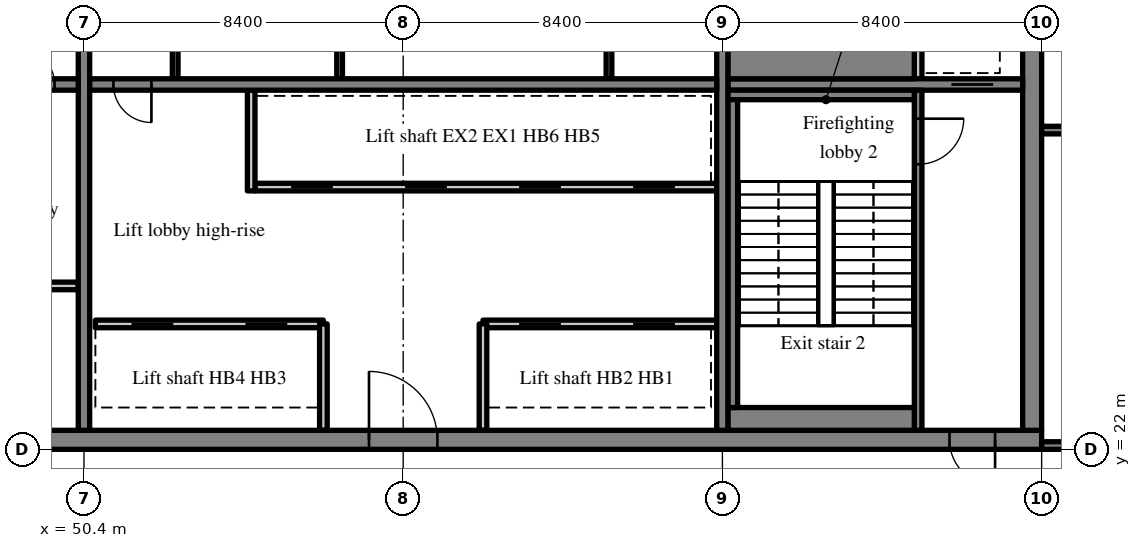
"""IFC4 building model, lengths in metres.
Left out: names, types, materials, properties, quantities, classifications, styles, units other than length and angle.
Written with IfcOpenShell. Run it as: python <this file> out.ifc"""

import sys

from ifc_helpers import new_model, si_unit, direction, frame, frame_2d, origin, place, context, subcontext, project, spatial, rectangle, extrude, source, transform, mapped, element, fill, save


model = new_model("IFC4")
c1 = context("Model", 3, precision=1e-05, world=origin(), true_north=direction((0.0, 1.0)))
c2 = subcontext(c1, "Body", "Model", "MODEL_VIEW")
j1 = project(units=[si_unit("LENGTHUNIT", "METRE"), si_unit("PLANEANGLEUNIT", "RADIAN")], contexts=[c1])
p1 = place(None, origin())
s1 = spatial("IfcSite", under=j1, at=p1, CompositionType="ELEMENT")
p2 = place(p1, origin())
s2 = spatial("IfcBuilding", under=s1, at=p2, CompositionType="ELEMENT")
p3 = place(p2, frame((0.0, 0.0, 323.7)))
s3 = spatial("IfcBuildingStorey", under=s2, at=p3, CompositionType="ELEMENT", Elevation=323.7)
m1 = source(origin(), c2, "Body", "SweptSolid", [
    extrude(rectangle(XDim=50.4, YDim=0.5, at=frame_2d((25.2, 0.0))), origin(), (0.0, 0.0, 1.0), 5.72),
])
p4 = place(p3, frame((25.2, 22.25, 0.0), z_axis=(0.0, 0.0, 1.0), x_axis=(1.0, 0.0, 0.0)))
e1 = element("IfcWall", 1, at=p4, inside=s3, PredefinedType="SHEAR", context=c2, shape_type="MappedRepresentation", body=[
    mapped(m1, transform((0.0, 0.0, 0.0), scale=1.0)),
])
m2 = source(origin(), c2, "Body", "SweptSolid", [
    extrude(rectangle(XDim=1.8, YDim=2.1, at=frame_2d((0.9, 1.05))), frame((0.0, 0.26, 0.0), z_axis=(0.0, -1.0, 0.0), x_axis=(1.0, 0.0, 0.0)), (0.0, 0.0, 1.0), 0.52),
])
p5 = place(p4, frame((15.9, 0.0, 0.0)))
e2 = element("IfcOpeningElement", 2, at=p5, cuts=e1, PredefinedType="OPENING", context=c2, shape_type="MappedRepresentation", body=[
    mapped(m2, transform((0.0, 0.0, 0.0), scale=1.0)),
])
m3 = source(origin(), c2, "Body", "SweptSolid", [
    extrude(rectangle(XDim=0.9, YDim=2.1, at=frame_2d((0.45, 1.05))), frame((0.0, 0.26, 0.0), z_axis=(0.0, -1.0, 0.0), x_axis=(1.0, 0.0, 0.0)), (0.0, 0.0, 1.0), 0.52),
])
p6 = place(p4, frame((9.675, 0.0, 0.0)))
e3 = element("IfcOpeningElement", 3, at=p6, cuts=e1, PredefinedType="OPENING", context=c2, shape_type="MappedRepresentation", body=[
    mapped(m3, transform((0.0, 0.0, 0.0), scale=1.0)),
])
p7 = place(p4, frame((21.525, 0.0, 0.0)))
e4 = element("IfcOpeningElement", 4, at=p7, cuts=e1, PredefinedType="OPENING", context=c2, shape_type="MappedRepresentation", body=[
    mapped(m3, transform((0.0, 0.0, 0.0), scale=1.0)),
])
p8 = place(p4, frame((32.7, 0.0, 0.0)))
e5 = element("IfcOpeningElement", 5, at=p8, cuts=e1, PredefinedType="OPENING", context=c2, shape_type="MappedRepresentation", body=[
    mapped(m2, transform((0.0, 0.0, 0.0), scale=1.0)),
])
m4 = source(origin(), c2, "Body", "SweptSolid", [
    extrude(rectangle(XDim=1.2, YDim=2.1, at=frame_2d((0.6, 1.05))), frame((0.0, 0.26, 0.0), z_axis=(0.0, -1.0, 0.0), x_axis=(1.0, 0.0, 0.0)), (0.0, 0.0, 1.0), 0.52),
])
p9 = place(p4, frame((6.5, 0.0, 0.0)))
e6 = element("IfcOpeningElement", 6, at=p9, cuts=e1, PredefinedType="OPENING", context=c2, shape_type="MappedRepresentation", body=[
    mapped(m4, transform((0.0, 0.0, 0.0), scale=1.0)),
])
p10 = place(p4, frame((47.975, 0.0, 0.0)))
e7 = element("IfcOpeningElement", 7, at=p10, cuts=e1, PredefinedType="OPENING", context=c2, shape_type="MappedRepresentation", body=[
    mapped(m4, transform((0.0, 0.0, 0.0), scale=1.0)),
])
m5 = source(origin(), c2, "Body", "SweptSolid", [
    extrude(rectangle(XDim=19.0, YDim=0.5, at=frame_2d((9.5, 0.0))), origin(), (0.0, 0.0, 1.0), 5.72),
])
p11 = place(p3, frame((75.35, 22.5, 0.0), z_axis=(0.0, 0.0, 1.0), x_axis=(0.0, 1.0, 0.0)))
e8 = element("IfcWall", 8, at=p11, inside=s3, PredefinedType="SHEAR", context=c2, shape_type="MappedRepresentation", body=[
    mapped(m5, transform((0.0, 0.0, 0.0), scale=1.0)),
])
p12 = place(p11, frame((12.9, 0.0, 0.0)))
e9 = element("IfcOpeningElement", 9, at=p12, cuts=e8, PredefinedType="OPENING", context=c2, shape_type="MappedRepresentation", body=[
    mapped(m4, transform((0.0, 0.0, 0.0), scale=1.0)),
])
m6 = source(origin(), c2, "Body", "SweptSolid", [
    extrude(rectangle(XDim=19.0, YDim=0.3, at=frame_2d((9.5, 0.0))), origin(), (0.0, 0.0, 1.0), 5.72),
])
p13 = place(p3, frame((50.4, 22.5, 0.0), z_axis=(0.0, 0.0, 1.0), x_axis=(0.0, 1.0, 0.0)))
e10 = element("IfcWall", 10, at=p13, inside=s3, PredefinedType="SHEAR", context=c2, shape_type="MappedRepresentation", body=[
    mapped(m6, transform((0.0, 0.0, 0.0), scale=1.0)),
])
m7 = source(origin(), c2, "Body", "SweptSolid", [
    extrude(rectangle(XDim=1.1, YDim=2.1, at=frame_2d((0.55, 1.05))), frame((0.0, 0.16, 0.0), z_axis=(0.0, -1.0, 0.0), x_axis=(1.0, 0.0, 0.0)), (0.0, 0.0, 1.0), 0.32),
])
p14 = place(p13, frame((12.95, 0.0, 0.0)))
e11 = element("IfcOpeningElement", 11, at=p14, cuts=e10, PredefinedType="OPENING", context=c2, shape_type="MappedRepresentation", body=[
    mapped(m7, transform((0.0, 0.0, 0.0), scale=1.0)),
])
p15 = place(p3, frame((67.2, 22.5, 0.0), z_axis=(0.0, 0.0, 1.0), x_axis=(0.0, 1.0, 0.0)))
e12 = element("IfcWall", 12, at=p15, inside=s3, PredefinedType="SHEAR", context=c2, shape_type="MappedRepresentation", body=[
    mapped(m6, transform((0.0, 0.0, 0.0), scale=1.0)),
])
m8 = source(origin(), c2, "Body", "SweptSolid", [
    extrude(rectangle(XDim=16.5, YDim=0.3, at=frame_2d((8.25, 0.0))), origin(), (0.0, 0.0, 1.0), 5.72),
])
p16 = place(p3, frame((33.75, 31.6, 0.0), z_axis=(0.0, 0.0, 1.0), x_axis=(1.0, 0.0, 0.0)))
e13 = element("IfcWall", 13, at=p16, inside=s3, PredefinedType="SHEAR", context=c2, shape_type="MappedRepresentation", body=[
    mapped(m8, transform((0.0, 0.0, 0.0), scale=1.0)),
])
m9 = source(origin(), c2, "Body", "SweptSolid", [
    extrude(rectangle(XDim=1.0, YDim=2.1, at=frame_2d((0.5, 1.05))), frame((0.0, 0.16, 0.0), z_axis=(0.0, -1.0, 0.0), x_axis=(1.0, 0.0, 0.0)), (0.0, 0.0, 1.0), 0.32),
])
p17 = place(p16, frame((14.875, 0.0, 0.0)))
e14 = element("IfcOpeningElement", 14, at=p17, cuts=e13, PredefinedType="OPENING", context=c2, shape_type="MappedRepresentation", body=[
    mapped(m9, transform((0.0, 0.0, 0.0), scale=1.0)),
])
p18 = place(p3, frame((50.55, 31.6, 0.0), z_axis=(0.0, 0.0, 1.0), x_axis=(1.0, 0.0, 0.0)))
e15 = element("IfcWall", 15, at=p18, inside=s3, PredefinedType="SHEAR", context=c2, shape_type="MappedRepresentation", body=[
    mapped(m8, transform((0.0, 0.0, 0.0), scale=1.0)),
])
p19 = place(p18, frame((0.625, 0.0, 0.0)))
e16 = element("IfcOpeningElement", 16, at=p19, cuts=e15, PredefinedType="OPENING", context=c2, shape_type="MappedRepresentation", body=[
    mapped(m9, transform((0.0, 0.0, 0.0), scale=1.0)),
])
m10 = source(origin(), c2, "Body", "SweptSolid", [
    extrude(rectangle(XDim=7.75, YDim=0.3, at=frame_2d((3.875, 0.0))), origin(), (0.0, 0.0, 1.0), 5.72),
])
p20 = place(p3, frame((67.35, 31.6, 0.0), z_axis=(0.0, 0.0, 1.0), x_axis=(1.0, 0.0, 0.0)))
e17 = element("IfcWall", 17, at=p20, inside=s3, PredefinedType="SHEAR", context=c2, shape_type="MappedRepresentation", body=[
    mapped(m10, transform((0.0, 0.0, 0.0), scale=1.0)),
])
p21 = place(p20, frame((5.875, 0.0, 0.0)))
e18 = element("IfcOpeningElement", 18, at=p21, cuts=e17, PredefinedType="OPENING", context=c2, shape_type="MappedRepresentation", body=[
    mapped(m7, transform((0.0, 0.0, 0.0), scale=1.0)),
])
m11 = source(origin(), c2, "Body", "SweptSolid", [
    extrude(rectangle(XDim=6.15, YDim=0.2, at=frame_2d((3.075, 0.0))), origin(), (0.0, 0.0, 1.0), 5.72),
])
p22 = place(p3, frame((44.1, 26.3, 0.0), z_axis=(0.0, 0.0, 1.0), x_axis=(1.0, 0.0, 0.0)))
e19 = element("IfcWall", 19, at=p22, inside=s3, PredefinedType="PARTITIONING", context=c2, shape_type="MappedRepresentation", body=[
    mapped(m11, transform((0.0, 0.0, 0.0), scale=1.0)),
])
m12 = source(origin(), c2, "Body", "SweptSolid", [
    extrude(rectangle(XDim=6.15, YDim=0.2, at=frame_2d((3.075, 0.0))), origin(), (0.0, 0.0, 1.0), 5.72),
])
p23 = place(p3, frame((67.05, 25.3, 0.0), z_axis=(0.0, 0.0, 1.0), x_axis=(-1.0, 0.0, 0.0)))
e20 = element("IfcWall", 20, at=p23, inside=s3, PredefinedType="SOLIDWALL", context=c2, shape_type="MappedRepresentation", body=[
    mapped(m12, transform((0.0, 0.0, 0.0), scale=1.0)),
])
m13 = source(origin(), c2, "Body", "SweptSolid", [
    extrude(rectangle(XDim=1.1, YDim=2.1, at=frame_2d((0.55, 1.05))), frame((0.0, 0.11, 0.0), z_axis=(0.0, -1.0, 0.0), x_axis=(1.0, 0.0, 0.0)), (0.0, 0.0, 1.0), 0.22),
])
p24 = place(p23, frame((1.1, 0.0, 0.0)))
e21 = element("IfcOpeningElement", 21, at=p24, cuts=e20, PredefinedType="OPENING", context=c2, shape_type="MappedRepresentation", body=[
    mapped(m13, transform((0.0, 0.0, 0.0), scale=1.0)),
])
p25 = place(p23, frame((4.1, 0.0, 0.0)))
e22 = element("IfcOpeningElement", 22, at=p25, cuts=e20, PredefinedType="OPENING", context=c2, shape_type="MappedRepresentation", body=[
    mapped(m13, transform((0.0, 0.0, 0.0), scale=1.0)),
])
m14 = source(origin(), c2, "Body", "SweptSolid", [
    extrude(rectangle(XDim=6.0, YDim=0.2, at=frame_2d((3.0, 0.0))), origin(), (0.0, 0.0, 1.0), 5.72),
])
p26 = place(p3, frame((56.7, 25.3, 0.0), z_axis=(0.0, 0.0, 1.0), x_axis=(-1.0, 0.0, 0.0)))
e23 = element("IfcWall", 23, at=p26, inside=s3, PredefinedType="SOLIDWALL", context=c2, shape_type="MappedRepresentation", body=[
    mapped(m14, transform((0.0, 0.0, 0.0), scale=1.0)),
])
p27 = place(p26, frame((0.95, 0.0, 0.0)))
e24 = element("IfcOpeningElement", 24, at=p27, cuts=e23, PredefinedType="OPENING", context=c2, shape_type="MappedRepresentation", body=[
    mapped(m13, transform((0.0, 0.0, 0.0), scale=1.0)),
])
p28 = place(p26, frame((3.95, 0.0, 0.0)))
e25 = element("IfcOpeningElement", 25, at=p28, cuts=e23, PredefinedType="OPENING", context=c2, shape_type="MappedRepresentation", body=[
    mapped(m13, transform((0.0, 0.0, 0.0), scale=1.0)),
])
m15 = source(origin(), c2, "Body", "SweptSolid", [
    extrude(rectangle(XDim=12.15, YDim=0.2, at=frame_2d((6.075, 0.0))), origin(), (0.0, 0.0, 1.0), 5.72),
])
p29 = place(p3, frame((67.05, 28.9, 0.0), z_axis=(0.0, 0.0, 1.0), x_axis=(-1.0, 0.0, 0.0)))
e26 = element("IfcWall", 26, at=p29, inside=s3, PredefinedType="SOLIDWALL", context=c2, shape_type="MappedRepresentation", body=[
    mapped(m15, transform((0.0, 0.0, 0.0), scale=1.0)),
])
p30 = place(p29, frame((7.1, 0.0, 0.0)))
e27 = element("IfcOpeningElement", 27, at=p30, cuts=e26, PredefinedType="OPENING", context=c2, shape_type="MappedRepresentation", body=[
    mapped(m13, transform((0.0, 0.0, 0.0), scale=1.0)),
])
p31 = place(p29, frame((10.1, 0.0, 0.0)))
e28 = element("IfcOpeningElement", 28, at=p31, cuts=e26, PredefinedType="OPENING", context=c2, shape_type="MappedRepresentation", body=[
    mapped(m13, transform((0.0, 0.0, 0.0), scale=1.0)),
])
p32 = place(p29, frame((1.1, 0.0, 0.0)))
e29 = element("IfcOpeningElement", 29, at=p32, cuts=e26, PredefinedType="OPENING", context=c2, shape_type="MappedRepresentation", body=[
    mapped(m13, transform((0.0, 0.0, 0.0), scale=1.0)),
])
p33 = place(p29, frame((4.1, 0.0, 0.0)))
e30 = element("IfcOpeningElement", 30, at=p33, cuts=e26, PredefinedType="OPENING", context=c2, shape_type="MappedRepresentation", body=[
    mapped(m13, transform((0.0, 0.0, 0.0), scale=1.0)),
])
m16 = source(origin(), c2, "Body", "SweptSolid", [
    extrude(rectangle(XDim=2.8, YDim=0.2, at=frame_2d((1.4, 0.0))), origin(), (0.0, 0.0, 1.0), 5.72),
])
for number, where, z_axis, x_axis in (
    (31, (60.9, 22.5, 0.0), (0.0, 0.0, 1.0), (0.0, 1.0, 0.0)),
    (32, (56.7, 22.5, 0.0), (0.0, 0.0, 1.0), (0.0, 1.0, 0.0)),
):
    element("IfcWall", number, at=place(p3, frame(where, z_axis=z_axis, x_axis=x_axis)), inside=s3, PredefinedType="SOLIDWALL", context=c2, shape_type="MappedRepresentation", body=[
        mapped(m16, transform((0.0, 0.0, 0.0), scale=1.0)),
    ])
m17 = source(origin(), c2, "Body", "SweptSolid", [
    extrude(rectangle(XDim=2.65, YDim=0.2, at=frame_2d((1.325, 0.0))), origin(), (0.0, 0.0, 1.0), 5.72),
])
p34 = place(p3, frame((54.8, 28.8, 0.0), z_axis=(0.0, 0.0, 1.0), x_axis=(0.0, 1.0, 0.0)))
e33 = element("IfcWall", 33, at=p34, inside=s3, PredefinedType="SOLIDWALL", context=c2, shape_type="MappedRepresentation", body=[
    mapped(m17, transform((0.0, 0.0, 0.0), scale=1.0)),
])
m18 = source(origin(), c2, "Body", "SweptSolid", [
    extrude(rectangle(XDim=3.25, YDim=0.15, at=frame_2d((1.625, 0.0))), origin(), (0.0, 0.0, 1.0), 5.72),
])
for number, where, z_axis, x_axis in (
    (34, (52.8, 31.75, 0.0), (0.0, 0.0, 1.0), (0.0, 1.0, 0.0)),
    (35, (64.215, 31.75, 0.0), (0.0, 0.0, 1.0), (0.0, 1.0, 0.0)),
    (36, (57.127, 31.75, 0.0), (0.0, 0.0, 1.0), (0.0, 1.0, 0.0)),
):
    element("IfcWall", number, at=place(p3, frame(where, z_axis=z_axis, x_axis=x_axis)), inside=s3, PredefinedType="PARTITIONING", context=c2, shape_type="MappedRepresentation", body=[
        mapped(m18, transform((0.0, 0.0, 0.0), scale=1.0)),
    ])
m19 = source(origin(), c2, "Body", "SweptSolid", [
    extrude(rectangle(XDim=8.95, YDim=0.2, at=frame_2d((4.475, 0.0))), origin(), (0.0, 0.0, 1.0), 5.72),
])
p35 = place(p3, frame((72.35, 22.5, 0.0), z_axis=(0.0, 0.0, 1.0), x_axis=(0.0, 1.0, 0.0)))
e37 = element("IfcWall", 37, at=p35, inside=s3, PredefinedType="SOLIDWALL", context=c2, shape_type="MappedRepresentation", body=[
    mapped(m19, transform((0.0, 0.0, 0.0), scale=1.0)),
])
m20 = source(origin(), c2, "Body", "SweptSolid", [
    extrude(rectangle(XDim=1.2, YDim=2.1, at=frame_2d((0.6, 1.05))), frame((0.0, 0.11, 0.0), z_axis=(0.0, -1.0, 0.0), x_axis=(1.0, 0.0, 0.0)), (0.0, 0.0, 1.0), 0.22),
])
p36 = place(p35, frame((7.0, 0.0, 0.0)))
e38 = element("IfcOpeningElement", 38, at=p36, cuts=e37, PredefinedType="OPENING", context=c2, shape_type="MappedRepresentation", body=[
    mapped(m20, transform((0.0, 0.0, 0.0), scale=1.0)),
])
m21 = source(origin(), c2, "Body", "SweptSolid", [
    extrude(rectangle(XDim=1.85, YDim=0.2, at=frame_2d((0.925, 0.0))), origin(), (0.0, 0.0, 1.0), 5.72),
])
p37 = place(p3, frame((72.35, 31.75, 0.0), z_axis=(0.0, 0.0, 1.0), x_axis=(0.0, 1.0, 0.0)))
e39 = element("IfcWall", 39, at=p37, inside=s3, PredefinedType="SOLIDWALL", context=c2, shape_type="MappedRepresentation", body=[
    mapped(m21, transform((0.0, 0.0, 0.0), scale=1.0)),
])
m22 = source(origin(), c2, "Body", "SweptSolid", [
    extrude(rectangle(XDim=8.15, YDim=0.2, at=frame_2d((4.075, 0.0))), origin(), (0.0, 0.0, 1.0), 5.72),
])
p38 = place(p3, frame((83.75, 22.1, 0.0), z_axis=(0.0, 0.0, 1.0), x_axis=(-1.0, 0.0, 0.0)))
e40 = element("IfcWall", 40, at=p38, inside=s3, PredefinedType="SOLIDWALL", context=c2, shape_type="MappedRepresentation", body=[
    mapped(m22, transform((0.0, 0.0, 0.0), scale=1.0)),
])
p39 = place(p38, frame((5.95, 0.0, 0.0)))
e41 = element("IfcOpeningElement", 41, at=p39, cuts=e40, PredefinedType="OPENING", context=c2, shape_type="MappedRepresentation", body=[
    mapped(m20, transform((0.0, 0.0, 0.0), scale=1.0)),
])
p40 = place(p3, frame((83.75, 30.4, 0.0), z_axis=(0.0, 0.0, 1.0), x_axis=(-1.0, 0.0, 0.0)))
e42 = element("IfcWall", 42, at=p40, inside=s3, PredefinedType="SOLIDWALL", context=c2, shape_type="MappedRepresentation", body=[
    mapped(m22, transform((0.0, 0.0, 0.0), scale=1.0)),
])
m23 = source(origin(), c2, "Body", "SweptSolid", [
    extrude(rectangle(XDim=1.0, YDim=2.1, at=frame_2d((0.5, 1.05))), frame((0.0, 0.11, 0.0), z_axis=(0.0, -1.0, 0.0), x_axis=(1.0, 0.0, 0.0)), (0.0, 0.0, 1.0), 0.22),
])
p41 = place(p40, frame((6.05, 0.0, 0.0)))
e43 = element("IfcOpeningElement", 43, at=p41, cuts=e42, PredefinedType="OPENING", context=c2, shape_type="MappedRepresentation", body=[
    mapped(m23, transform((0.0, 0.0, 0.0), scale=1.0)),
])
m24 = source(origin(), c2, "Body", "SweptSolid", [
    extrude(rectangle(XDim=4.9, YDim=0.6, at=frame_2d((2.45, 0.0))), origin(), (0.0, 0.0, 1.0), 5.72),
])
p42 = place(p3, frame((67.35, 22.8, 0.0), z_axis=(0.0, 0.0, 1.0), x_axis=(1.0, 0.0, 0.0)))
e44 = element("IfcWall", 44, at=p42, inside=s3, PredefinedType="SOLIDWALL", context=c2, shape_type="MappedRepresentation", body=[
    mapped(m24, transform((0.0, 0.0, 0.0), scale=1.0)),
])
m25 = source(origin(), c2, "Body", "SweptSolid", [
    extrude(rectangle(XDim=4.9, YDim=0.25, at=frame_2d((2.45, 0.0))), origin(), (0.0, 0.0, 1.0), 5.72),
])
p43 = place(p3, frame((67.35, 31.325, 0.0), z_axis=(0.0, 0.0, 1.0), x_axis=(1.0, 0.0, 0.0)))
e45 = element("IfcWall", 45, at=p43, inside=s3, PredefinedType="SOLIDWALL", context=c2, shape_type="MappedRepresentation", body=[
    mapped(m25, transform((0.0, 0.0, 0.0), scale=1.0)),
])
m26 = source(origin(), c2, "Body", "SweptSolid", [
    extrude(rectangle(XDim=8.1, YDim=0.25, at=frame_2d((4.05, 0.0))), origin(), (0.0, 0.0, 1.0), 5.72),
])
p44 = place(p3, frame((67.475, 23.1, 0.0), z_axis=(0.0, 0.0, 1.0), x_axis=(0.0, 1.0, 0.0)))
e46 = element("IfcWall", 46, at=p44, inside=s3, PredefinedType="SOLIDWALL", context=c2, shape_type="MappedRepresentation", body=[
    mapped(m26, transform((0.0, 0.0, 0.0), scale=1.0)),
])
m27 = source(origin(), c2, "Body", "SweptSolid", [
    extrude(rectangle(XDim=4.9, YDim=1.05, at=frame_2d((2.45, 0.0))), origin(), (0.0, 0.0, 1.0), 5.72),
])
p45 = place(p3, frame((67.35, 32.275, 0.0), z_axis=(0.0, 0.0, 1.0), x_axis=(1.0, 0.0, 0.0)))
e47 = element("IfcWall", 47, at=p45, inside=s3, PredefinedType="SOLIDWALL", context=c2, shape_type="MappedRepresentation", body=[
    mapped(m27, transform((0.0, 0.0, 0.0), scale=1.0)),
])
m28 = source(origin(), c2, "Body", "SweptSolid", [
    extrude(rectangle(XDim=1.0, YDim=2.1, at=frame_2d((0.5, 1.05))), frame((0.0, 0.025, 0.0), z_axis=(0.0, -1.0, 0.0), x_axis=(1.0, 0.0, 0.0)), (0.0, 0.0, 1.0), 0.05),
])
p46 = place(p17, origin())
e48 = element("IfcDoor", 48, at=p46, inside=s3, OperationType="SINGLE_SWING_LEFT", PredefinedType="DOOR", context=c2, shape_type="MappedRepresentation", body=[
    mapped(m28, transform((0.0, 0.0, 0.0), scale=1.0)),
])
fill(e14, e48)
m29 = source(origin(), c2, "Body", "SweptSolid", [
    extrude(rectangle(XDim=1.8, YDim=2.1, at=frame_2d((0.9, 1.05))), frame((0.0, 0.175, 0.0), z_axis=(0.0, -1.0, 0.0), x_axis=(1.0, 0.0, 0.0)), (0.0, 0.0, 1.0), 0.05),
])
p47 = place(p8, origin())
e49 = element("IfcDoor", 49, at=p47, inside=s3, OperationType="DOUBLE_DOOR_SINGLE_SWING", PredefinedType="DOOR", context=c2, shape_type="MappedRepresentation", body=[
    mapped(m29, transform((0.0, 0.0, 0.0), scale=1.0)),
])
fill(e5, e49)
p48 = place(p19, origin())
e50 = element("IfcDoor", 50, at=p48, inside=s3, OperationType="SINGLE_SWING_RIGHT", PredefinedType="DOOR", context=c2, shape_type="MappedRepresentation", body=[
    mapped(m28, transform((0.0, 0.0, 0.0), scale=1.0)),
])
fill(e16, e50)
m30 = source(origin(), c2, "Body", "SweptSolid", [
    extrude(rectangle(XDim=1.1, YDim=2.1, at=frame_2d((0.55, 1.05))), frame((0.0, 0.025, 0.0), z_axis=(0.0, -1.0, 0.0), x_axis=(1.0, 0.0, 0.0)), (0.0, 0.0, 1.0), 0.05),
])
p49 = place(p30, origin())
e51 = element("IfcDoor", 51, at=p49, inside=s3, OperationType="SLIDING_TO_RIGHT", PredefinedType="DOOR", context=c2, shape_type="MappedRepresentation", body=[
    mapped(m30, transform((0.0, 0.0, 0.0), scale=1.0)),
])
fill(e27, e51)
p50 = place(p31, origin())
e52 = element("IfcDoor", 52, at=p50, inside=s3, OperationType="SLIDING_TO_LEFT", PredefinedType="DOOR", context=c2, shape_type="MappedRepresentation", body=[
    mapped(m30, transform((0.0, 0.0, 0.0), scale=1.0)),
])
fill(e28, e52)
p51 = place(p24, origin())
e53 = element("IfcDoor", 53, at=p51, inside=s3, OperationType="SLIDING_TO_RIGHT", PredefinedType="DOOR", context=c2, shape_type="MappedRepresentation", body=[
    mapped(m30, transform((0.0, 0.0, 0.0), scale=1.0)),
])
fill(e21, e53)
p52 = place(p25, origin())
e54 = element("IfcDoor", 54, at=p52, inside=s3, OperationType="SLIDING_TO_LEFT", PredefinedType="DOOR", context=c2, shape_type="MappedRepresentation", body=[
    mapped(m30, transform((0.0, 0.0, 0.0), scale=1.0)),
])
fill(e22, e54)
p53 = place(p27, origin())
e55 = element("IfcDoor", 55, at=p53, inside=s3, OperationType="SLIDING_TO_RIGHT", PredefinedType="DOOR", context=c2, shape_type="MappedRepresentation", body=[
    mapped(m30, transform((0.0, 0.0, 0.0), scale=1.0)),
])
fill(e24, e55)
p54 = place(p28, origin())
e56 = element("IfcDoor", 56, at=p54, inside=s3, OperationType="SLIDING_TO_LEFT", PredefinedType="DOOR", context=c2, shape_type="MappedRepresentation", body=[
    mapped(m30, transform((0.0, 0.0, 0.0), scale=1.0)),
])
fill(e25, e56)
p55 = place(p32, origin())
e57 = element("IfcDoor", 57, at=p55, inside=s3, OperationType="SLIDING_TO_RIGHT", PredefinedType="DOOR", context=c2, shape_type="MappedRepresentation", body=[
    mapped(m30, transform((0.0, 0.0, 0.0), scale=1.0)),
])
fill(e29, e57)
p56 = place(p33, origin())
e58 = element("IfcDoor", 58, at=p56, inside=s3, OperationType="SLIDING_TO_LEFT", PredefinedType="DOOR", context=c2, shape_type="MappedRepresentation", body=[
    mapped(m30, transform((0.0, 0.0, 0.0), scale=1.0)),
])
fill(e30, e58)
m31 = source(origin(), c2, "Body", "SweptSolid", [
    extrude(rectangle(XDim=1.2, YDim=2.1, at=frame_2d((0.6, 1.05))), frame((0.0, 0.025, 0.0), z_axis=(0.0, -1.0, 0.0), x_axis=(1.0, 0.0, 0.0)), (0.0, 0.0, 1.0), 0.05),
])
p57 = place(p36, origin())
e59 = element("IfcDoor", 59, at=p57, inside=s3, OperationType="SINGLE_SWING_RIGHT", PredefinedType="DOOR", context=c2, shape_type="MappedRepresentation", body=[
    mapped(m31, transform((0.0, 0.0, 0.0), scale=1.0)),
])
fill(e38, e59)
m32 = source(origin(), c2, "Body", "SweptSolid", [
    extrude(rectangle(XDim=1.2, YDim=2.1, at=frame_2d((0.6, 1.05))), frame((0.0, 0.175, 0.0), z_axis=(0.0, -1.0, 0.0), x_axis=(1.0, 0.0, 0.0)), (0.0, 0.0, 1.0), 0.05),
])
p58 = place(p10, origin())
e60 = element("IfcDoor", 60, at=p58, inside=s3, OperationType="SINGLE_SWING_RIGHT", PredefinedType="DOOR", context=c2, shape_type="MappedRepresentation", body=[
    mapped(m32, transform((0.0, 0.0, 0.0), scale=1.0)),
])
fill(e7, e60)
p59 = place(p21, origin())
e61 = element("IfcDoor", 61, at=p59, inside=s3, OperationType="SLIDING_TO_LEFT", PredefinedType="DOOR", context=c2, shape_type="MappedRepresentation", body=[
    mapped(m30, transform((0.0, 0.0, 0.0), scale=1.0)),
])
fill(e18, e61)
save(model, sys.argv[1])
